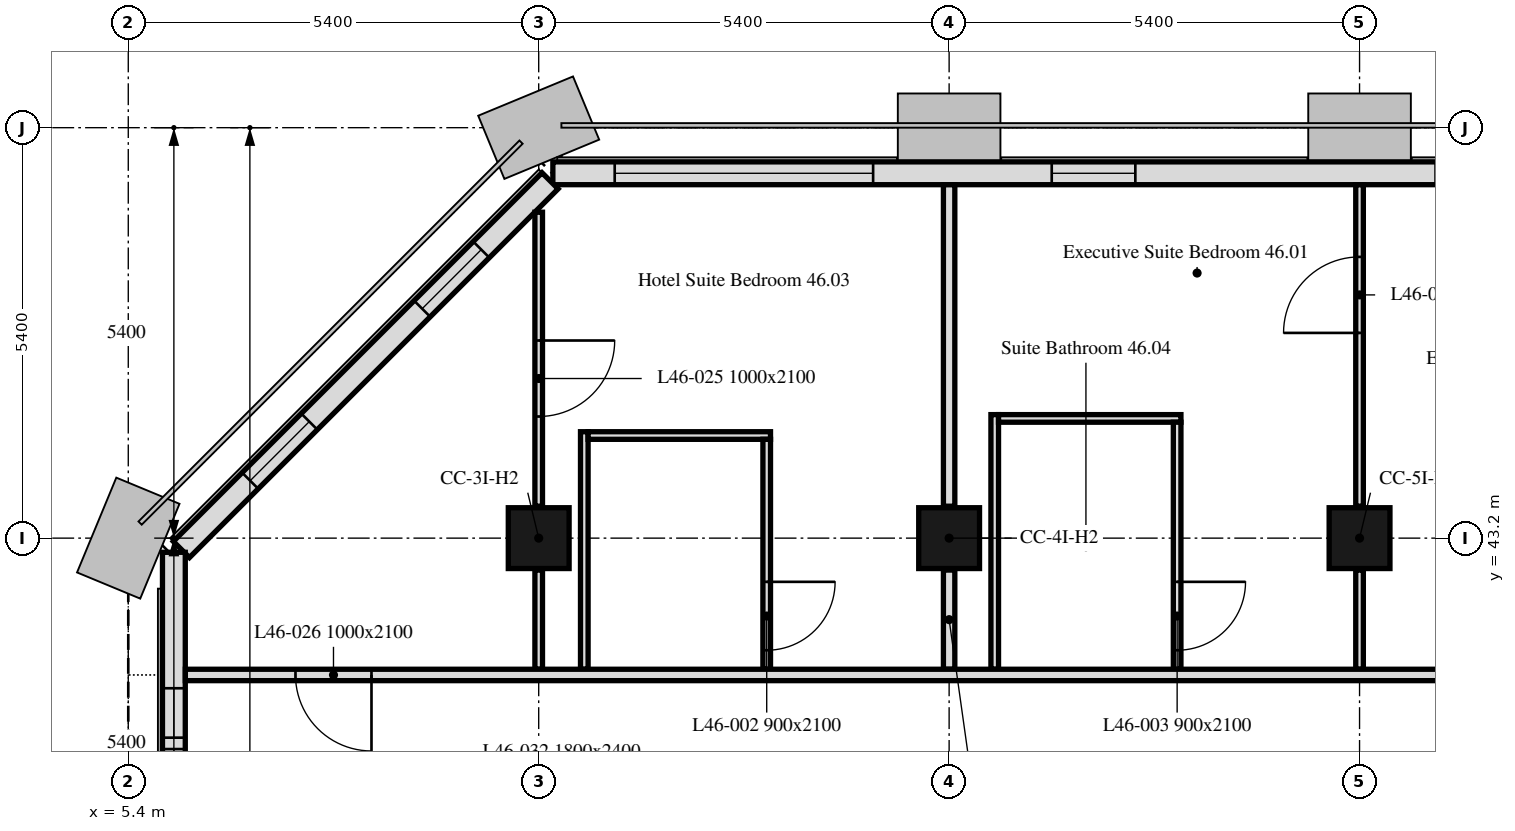
"""IFC4 building model, lengths in metres.
Left out: names, types, materials, properties, quantities, classifications, styles, units other than length and angle.
Written with IfcOpenShell. Run it as: python <this file> out.ifc"""

import sys

from ifc_helpers import new_model, si_unit, direction, frame, frame_2d, origin, origin_2d, place, context, subcontext, project, spatial, rectangle, extrude, element, fill, save


model = new_model("IFC4")
c1 = context("Model", 3, precision=1e-05, world=origin(), true_north=direction((0.0, 1.0)))
c2 = subcontext(c1, "Body", "Model", "MODEL_VIEW")
j1 = project(units=[si_unit("LENGTHUNIT", "METRE"), si_unit("PLANEANGLEUNIT", "RADIAN")], contexts=[c1])
p1 = place(None, origin())
s1 = spatial("IfcSite", under=j1, at=p1, CompositionType="ELEMENT")
p2 = place(p1, origin())
s2 = spatial("IfcBuilding", under=s1, at=p2, CompositionType="ELEMENT")
p3 = place(p2, frame((0.0, 0.0, 190.6)))
s3 = spatial("IfcBuildingStorey", under=s2, at=p3, CompositionType="ELEMENT", Elevation=190.6)
for number, where, z_axis, x_axis in (
    (1, (10.8, 43.2, 0.0), (0.0, 0.0, 1.0), (1.0, 0.0, 0.0)),
    (2, (16.2, 43.2, 0.0), (0.0, 0.0, 1.0), (1.0, 0.0, 0.0)),
    (3, (21.6, 43.2, 0.0), (0.0, 0.0, 1.0), (1.0, 0.0, 0.0)),
):
    element("IfcColumn", number, at=place(p3, frame(where, z_axis=z_axis, x_axis=x_axis)), inside=s3, PredefinedType="COLUMN", context=c2, shape_type="SweptSolid", body=[
        extrude(rectangle(XDim=0.8, YDim=0.8, at=origin_2d()), origin(), (0.0, 0.0, 1.0), 3.0),
    ])
p4 = place(p3, frame((43.014, 48.0, 0.0), z_axis=(0.0, 0.0, 1.0), x_axis=(-1.0, 0.0, 0.0)))
e4 = element("IfcWall", 4, at=p4, inside=s3, PredefinedType="SOLIDWALL", context=c2, shape_type="SweptSolid", body=[
    extrude(rectangle(XDim=32.027, YDim=0.3, at=frame_2d((16.014, 0.0))), origin(), (0.0, 0.0, 1.0), 3.0),
])
p5 = place(p4, frame((2.764, 0.0, 0.9)))
e5 = element("IfcOpeningElement", 5, at=p5, cuts=e4, PredefinedType="OPENING", context=c2, shape_type="SweptSolid", body=[
    extrude(rectangle(XDim=1.1, YDim=1.7, at=frame_2d((0.55, 0.85))), frame((0.0, 0.16, 0.0), z_axis=(0.0, -1.0, 0.0), x_axis=(1.0, 0.0, 0.0)), (0.0, 0.0, 1.0), 0.32),
])
p6 = place(p4, frame((6.214, 0.0, 0.9)))
e6 = element("IfcOpeningElement", 6, at=p6, cuts=e4, PredefinedType="OPENING", context=c2, shape_type="SweptSolid", body=[
    extrude(rectangle(XDim=3.4, YDim=1.7, at=frame_2d((1.7, 0.85))), frame((0.0, 0.16, 0.0), z_axis=(0.0, -1.0, 0.0), x_axis=(1.0, 0.0, 0.0)), (0.0, 0.0, 1.0), 0.32),
])
p7 = place(p4, frame((13.564, 0.0, 0.9)))
e7 = element("IfcOpeningElement", 7, at=p7, cuts=e4, PredefinedType="OPENING", context=c2, shape_type="SweptSolid", body=[
    extrude(rectangle(XDim=1.1, YDim=1.7, at=frame_2d((0.55, 0.85))), frame((0.0, 0.16, 0.0), z_axis=(0.0, -1.0, 0.0), x_axis=(1.0, 0.0, 0.0)), (0.0, 0.0, 1.0), 0.32),
])
p8 = place(p4, frame((17.014, 0.0, 0.9)))
e8 = element("IfcOpeningElement", 8, at=p8, cuts=e4, PredefinedType="OPENING", context=c2, shape_type="SweptSolid", body=[
    extrude(rectangle(XDim=3.4, YDim=1.7, at=frame_2d((1.7, 0.85))), frame((0.0, 0.16, 0.0), z_axis=(0.0, -1.0, 0.0), x_axis=(1.0, 0.0, 0.0)), (0.0, 0.0, 1.0), 0.32),
])
p9 = place(p4, frame((24.364, 0.0, 0.9)))
e9 = element("IfcOpeningElement", 9, at=p9, cuts=e4, PredefinedType="OPENING", context=c2, shape_type="SweptSolid", body=[
    extrude(rectangle(XDim=1.1, YDim=1.7, at=frame_2d((0.55, 0.85))), frame((0.0, 0.16, 0.0), z_axis=(0.0, -1.0, 0.0), x_axis=(1.0, 0.0, 0.0)), (0.0, 0.0, 1.0), 0.32),
])
p10 = place(p4, frame((27.814, 0.0, 0.9)))
e10 = element("IfcOpeningElement", 10, at=p10, cuts=e4, PredefinedType="OPENING", context=c2, shape_type="SweptSolid", body=[
    extrude(rectangle(XDim=3.4, YDim=1.7, at=frame_2d((1.7, 0.85))), frame((0.0, 0.16, 0.0), z_axis=(0.0, -1.0, 0.0), x_axis=(1.0, 0.0, 0.0)), (0.0, 0.0, 1.0), 0.32),
])
p11 = place(p3, frame((10.949, 47.901, 0.0), z_axis=(0.0, 0.0, 1.0), x_axis=(-0.707106781187, -0.707106781187, 0.0)))
e11 = element("IfcWall", 11, at=p11, inside=s3, PredefinedType="SOLIDWALL", context=c2, shape_type="SweptSolid", body=[
    extrude(rectangle(XDim=6.86, YDim=0.3, at=frame_2d((3.43, 0.0))), origin(), (0.0, 0.0, 1.0), 3.0),
])
p12 = place(p11, frame((1.28, 0.0, 0.9)))
e12 = element("IfcOpeningElement", 12, at=p12, cuts=e11, PredefinedType="OPENING", context=c2, shape_type="SweptSolid", body=[
    extrude(rectangle(XDim=1.1, YDim=1.7, at=frame_2d((0.55, 0.85))), frame((0.0, 0.16, 0.0), z_axis=(0.0, -1.0, 0.0), x_axis=(1.0, 0.0, 0.0)), (0.0, 0.0, 1.0), 0.32),
])
p13 = place(p11, frame((4.48, 0.0, 0.9)))
e13 = element("IfcOpeningElement", 13, at=p13, cuts=e11, PredefinedType="OPENING", context=c2, shape_type="SweptSolid", body=[
    extrude(rectangle(XDim=1.1, YDim=1.7, at=frame_2d((0.55, 0.85))), frame((0.0, 0.16, 0.0), z_axis=(0.0, -1.0, 0.0), x_axis=(1.0, 0.0, 0.0)), (0.0, 0.0, 1.0), 0.32),
])
p14 = place(p3, frame((6.0, 43.014, 0.0), z_axis=(0.0, 0.0, 1.0), x_axis=(0.0, -1.0, 0.0)))
e14 = element("IfcWall", 14, at=p14, inside=s3, PredefinedType="SOLIDWALL", context=c2, shape_type="SweptSolid", body=[
    extrude(rectangle(XDim=10.614, YDim=0.3, at=frame_2d((5.307, 0.0))), origin(), (0.0, 0.0, 1.0), 3.0),
])
p15 = place(p14, frame((1.789, 0.0, 0.9)))
e15 = element("IfcOpeningElement", 15, at=p15, cuts=e14, PredefinedType="OPENING", context=c2, shape_type="SweptSolid", body=[
    extrude(rectangle(XDim=0.65, YDim=1.7, at=frame_2d((0.325, 0.85))), frame((0.0, 0.16, 0.0), z_axis=(0.0, -1.0, 0.0), x_axis=(1.0, 0.0, 0.0)), (0.0, 0.0, 1.0), 0.32),
])
p16 = place(p14, frame((2.589, 0.0, 0.9)))
e16 = element("IfcOpeningElement", 16, at=p16, cuts=e14, PredefinedType="OPENING", context=c2, shape_type="SweptSolid", body=[
    extrude(rectangle(XDim=0.65, YDim=1.7, at=frame_2d((0.325, 0.85))), frame((0.0, 0.16, 0.0), z_axis=(0.0, -1.0, 0.0), x_axis=(1.0, 0.0, 0.0)), (0.0, 0.0, 1.0), 0.32),
])
p17 = place(p14, frame((6.214, 0.0, 0.9)))
e17 = element("IfcOpeningElement", 17, at=p17, cuts=e14, PredefinedType="OPENING", context=c2, shape_type="SweptSolid", body=[
    extrude(rectangle(XDim=3.4, YDim=1.7, at=frame_2d((1.7, 0.85))), frame((0.0, 0.16, 0.0), z_axis=(0.0, -1.0, 0.0), x_axis=(1.0, 0.0, 0.0)), (0.0, 0.0, 1.0), 0.32),
])
p18 = place(p3, frame((10.8, 47.488, 0.0), z_axis=(0.0, 0.0, 1.0), x_axis=(0.0, -1.0, 0.0)))
e18 = element("IfcWall", 18, at=p18, inside=s3, PredefinedType="PARTITIONING", context=c2, shape_type="SweptSolid", body=[
    extrude(rectangle(XDim=3.868, YDim=0.1, at=frame_2d((1.934, 0.0))), origin(), (0.0, 0.0, 1.0), 3.0),
])
p19 = place(p18, frame((1.688, 0.0, 0.0)))
e19 = element("IfcOpeningElement", 19, at=p19, cuts=e18, PredefinedType="OPENING", context=c2, shape_type="SweptSolid", body=[
    extrude(rectangle(XDim=1.0, YDim=2.1, at=frame_2d((0.5, 1.05))), frame((0.0, 0.05, 0.0), z_axis=(0.0, -1.0, 0.0), x_axis=(1.0, 0.0, 0.0)), (0.0, 0.0, 1.0), 0.1),
])
p20 = place(p3, frame((10.8, 42.78, 0.0), z_axis=(0.0, 0.0, 1.0), x_axis=(0.0, -1.0, 0.0)))
e20 = element("IfcWall", 20, at=p20, inside=s3, PredefinedType="PARTITIONING", context=c2, shape_type="SweptSolid", body=[
    extrude(rectangle(XDim=1.305, YDim=0.1, at=frame_2d((0.652, 0.0))), origin(), (0.0, 0.0, 1.0), 3.0),
])
p21 = place(p3, frame((11.4, 41.475, 0.0), z_axis=(0.0, 0.0, 1.0), x_axis=(0.0, 1.0, 0.0)))
e21 = element("IfcWall", 21, at=p21, inside=s3, PredefinedType="PARTITIONING", context=c2, shape_type="SweptSolid", body=[
    extrude(rectangle(XDim=3.125, YDim=0.1, at=frame_2d((1.562, 0.0))), origin(), (0.0, 0.0, 1.0), 3.0),
])
p22 = place(p3, frame((11.45, 44.55, 0.0), z_axis=(0.0, 0.0, 1.0), x_axis=(1.0, 0.0, 0.0)))
e22 = element("IfcWall", 22, at=p22, inside=s3, PredefinedType="PARTITIONING", context=c2, shape_type="SweptSolid", body=[
    extrude(rectangle(XDim=2.4, YDim=0.1, at=frame_2d((1.2, 0.0))), origin(), (0.0, 0.0, 1.0), 3.0),
])
p23 = place(p3, frame((13.8, 44.5, 0.0), z_axis=(0.0, 0.0, 1.0), x_axis=(0.0, -1.0, 0.0)))
e23 = element("IfcWall", 23, at=p23, inside=s3, PredefinedType="PARTITIONING", context=c2, shape_type="SweptSolid", body=[
    extrude(rectangle(XDim=3.025, YDim=0.1, at=frame_2d((1.512, 0.0))), origin(), (0.0, 0.0, 1.0), 3.0),
])
p24 = place(p23, frame((1.875, 0.0, 0.0)))
e24 = element("IfcOpeningElement", 24, at=p24, cuts=e23, PredefinedType="OPENING", context=c2, shape_type="SweptSolid", body=[
    extrude(rectangle(XDim=0.9, YDim=2.1, at=frame_2d((0.45, 1.05))), frame((0.0, 0.05, 0.0), z_axis=(0.0, -1.0, 0.0), x_axis=(1.0, 0.0, 0.0)), (0.0, 0.0, 1.0), 0.1),
])
p25 = place(p3, frame((16.2, 41.475, 0.0), z_axis=(0.0, 0.0, 1.0), x_axis=(0.0, 1.0, 0.0)))
e25 = element("IfcWall", 25, at=p25, inside=s3, PredefinedType="PARTITIONING", context=c2, shape_type="SweptSolid", body=[
    extrude(rectangle(XDim=1.305, YDim=0.15, at=frame_2d((0.652, 0.0))), origin(), (0.0, 0.0, 1.0), 2.4),
])
p26 = place(p3, frame((16.2, 43.62, 0.0), z_axis=(0.0, 0.0, 1.0), x_axis=(0.0, 1.0, 0.0)))
e26 = element("IfcWall", 26, at=p26, inside=s3, PredefinedType="PARTITIONING", context=c2, shape_type="SweptSolid", body=[
    extrude(rectangle(XDim=4.229, YDim=0.15, at=frame_2d((2.115, 0.0))), origin(), (0.0, 0.0, 1.0), 2.4),
])
p27 = place(p3, frame((16.8, 41.475, 0.0), z_axis=(0.0, 0.0, 1.0), x_axis=(0.0, 1.0, 0.0)))
e27 = element("IfcWall", 27, at=p27, inside=s3, PredefinedType="PARTITIONING", context=c2, shape_type="SweptSolid", body=[
    extrude(rectangle(XDim=3.35, YDim=0.1, at=frame_2d((1.675, 0.0))), origin(), (0.0, 0.0, 1.0), 3.0),
])
p28 = place(p3, frame((16.85, 44.775, 0.0), z_axis=(0.0, 0.0, 1.0), x_axis=(1.0, 0.0, 0.0)))
e28 = element("IfcWall", 28, at=p28, inside=s3, PredefinedType="PARTITIONING", context=c2, shape_type="SweptSolid", body=[
    extrude(rectangle(XDim=2.4, YDim=0.1, at=frame_2d((1.2, 0.0))), origin(), (0.0, 0.0, 1.0), 3.0),
])
p29 = place(p3, frame((19.2, 44.725, 0.0), z_axis=(0.0, 0.0, 1.0), x_axis=(0.0, -1.0, 0.0)))
e29 = element("IfcWall", 29, at=p29, inside=s3, PredefinedType="PARTITIONING", context=c2, shape_type="SweptSolid", body=[
    extrude(rectangle(XDim=3.25, YDim=0.1, at=frame_2d((1.625, 0.0))), origin(), (0.0, 0.0, 1.0), 3.0),
])
p30 = place(p29, frame((2.1, 0.0, 0.0)))
e30 = element("IfcOpeningElement", 30, at=p30, cuts=e29, PredefinedType="OPENING", context=c2, shape_type="SweptSolid", body=[
    extrude(rectangle(XDim=0.9, YDim=2.1, at=frame_2d((0.45, 1.05))), frame((0.0, 0.05, 0.0), z_axis=(0.0, -1.0, 0.0), x_axis=(1.0, 0.0, 0.0)), (0.0, 0.0, 1.0), 0.1),
])
p31 = place(p3, frame((21.6, 41.475, 0.0), z_axis=(0.0, 0.0, 1.0), x_axis=(0.0, 1.0, 0.0)))
e31 = element("IfcWall", 31, at=p31, inside=s3, PredefinedType="PARTITIONING", context=c2, shape_type="SweptSolid", body=[
    extrude(rectangle(XDim=1.305, YDim=0.1, at=frame_2d((0.652, 0.0))), origin(), (0.0, 0.0, 1.0), 2.4),
])
p32 = place(p3, frame((21.6, 43.62, 0.0), z_axis=(0.0, 0.0, 1.0), x_axis=(0.0, 1.0, 0.0)))
e32 = element("IfcWall", 32, at=p32, inside=s3, PredefinedType="PARTITIONING", context=c2, shape_type="SweptSolid", body=[
    extrude(rectangle(XDim=4.229, YDim=0.1, at=frame_2d((2.115, 0.0))), origin(), (0.0, 0.0, 1.0), 2.4),
])
p33 = place(p32, frame((2.28, 0.0, 0.0)))
e33 = element("IfcOpeningElement", 33, at=p33, cuts=e32, PredefinedType="OPENING", context=c2, shape_type="SweptSolid", body=[
    extrude(rectangle(XDim=1.0, YDim=2.1, at=frame_2d((0.5, 1.05))), frame((0.0, 0.05, 0.0), z_axis=(0.0, -1.0, 0.0), x_axis=(1.0, 0.0, 0.0)), (0.0, 0.0, 1.0), 0.1),
])
p34 = place(p3, frame((47.849, 41.4, 0.0), z_axis=(0.0, 0.0, 1.0), x_axis=(-1.0, 0.0, 0.0)))
e34 = element("IfcWall", 34, at=p34, inside=s3, PredefinedType="PARTITIONING", context=c2, shape_type="SweptSolid", body=[
    extrude(rectangle(XDim=41.698, YDim=0.15, at=frame_2d((20.849, 0.0))), origin(), (0.0, 0.0, 1.0), 2.4),
])
p35 = place(p34, frame((39.249, 0.0, 0.0)))
e35 = element("IfcOpeningElement", 35, at=p35, cuts=e34, PredefinedType="OPENING", context=c2, shape_type="SweptSolid", body=[
    extrude(rectangle(XDim=1.0, YDim=2.1, at=frame_2d((0.5, 1.05))), frame((0.0, 0.075, 0.0), z_axis=(0.0, -1.0, 0.0), x_axis=(1.0, 0.0, 0.0)), (0.0, 0.0, 1.0), 0.15),
])
p36 = place(p34, frame((11.449, 0.0, 0.0)))
e36 = element("IfcOpeningElement", 36, at=p36, cuts=e34, PredefinedType="OPENING", context=c2, shape_type="SweptSolid", body=[
    extrude(rectangle(XDim=1.0, YDim=2.1, at=frame_2d((0.5, 1.05))), frame((0.0, 0.075, 0.0), z_axis=(0.0, -1.0, 0.0), x_axis=(1.0, 0.0, 0.0)), (0.0, 0.0, 1.0), 0.15),
])
p37 = place(p34, frame((3.099, 0.0, 0.0)))
e37 = element("IfcOpeningElement", 37, at=p37, cuts=e34, PredefinedType="OPENING", context=c2, shape_type="SweptSolid", body=[
    extrude(rectangle(XDim=1.0, YDim=2.1, at=frame_2d((0.5, 1.05))), frame((0.0, 0.075, 0.0), z_axis=(0.0, -1.0, 0.0), x_axis=(1.0, 0.0, 0.0)), (0.0, 0.0, 1.0), 0.15),
])
p38 = place(p34, frame((23.049, 0.0, 0.0)))
e38 = element("IfcOpeningElement", 38, at=p38, cuts=e34, PredefinedType="OPENING", context=c2, shape_type="SweptSolid", body=[
    extrude(rectangle(XDim=1.0, YDim=2.1, at=frame_2d((0.5, 1.05))), frame((0.0, 0.075, 0.0), z_axis=(0.0, -1.0, 0.0), x_axis=(1.0, 0.0, 0.0)), (0.0, 0.0, 1.0), 0.15),
])
p39 = place(p9, origin())
e39 = element("IfcWindow", 39, at=p39, inside=s3, PartitioningType="SINGLE_PANEL", PredefinedType="WINDOW", context=c2, shape_type="SweptSolid", body=[
    extrude(rectangle(XDim=1.1, YDim=1.7, at=frame_2d((0.55, 0.85))), frame((0.0, 0.03, 0.0), z_axis=(0.0, -1.0, 0.0), x_axis=(1.0, 0.0, 0.0)), (0.0, 0.0, 1.0), 0.06),
])
fill(e9, e39)
p40 = place(p10, origin())
e40 = element("IfcWindow", 40, at=p40, inside=s3, PartitioningType="SINGLE_PANEL", PredefinedType="WINDOW", context=c2, shape_type="SweptSolid", body=[
    extrude(rectangle(XDim=3.4, YDim=1.7, at=frame_2d((1.7, 0.85))), frame((0.0, 0.03, 0.0), z_axis=(0.0, -1.0, 0.0), x_axis=(1.0, 0.0, 0.0)), (0.0, 0.0, 1.0), 0.06),
])
fill(e10, e40)
p41 = place(p12, origin())
e41 = element("IfcWindow", 41, at=p41, inside=s3, PartitioningType="SINGLE_PANEL", PredefinedType="WINDOW", context=c2, shape_type="SweptSolid", body=[
    extrude(rectangle(XDim=1.1, YDim=1.7, at=frame_2d((0.55, 0.85))), frame((0.0, 0.03, 0.0), z_axis=(0.0, -1.0, 0.0), x_axis=(1.0, 0.0, 0.0)), (0.0, 0.0, 1.0), 0.06),
])
fill(e12, e41)
p42 = place(p13, origin())
e42 = element("IfcWindow", 42, at=p42, inside=s3, PartitioningType="SINGLE_PANEL", PredefinedType="WINDOW", context=c2, shape_type="SweptSolid", body=[
    extrude(rectangle(XDim=1.1, YDim=1.7, at=frame_2d((0.55, 0.85))), frame((0.0, 0.03, 0.0), z_axis=(0.0, -1.0, 0.0), x_axis=(1.0, 0.0, 0.0)), (0.0, 0.0, 1.0), 0.06),
])
fill(e13, e42)
p43 = place(p15, origin())
e43 = element("IfcWindow", 43, at=p43, inside=s3, PartitioningType="SINGLE_PANEL", PredefinedType="WINDOW", context=c2, shape_type="SweptSolid", body=[
    extrude(rectangle(XDim=0.65, YDim=1.7, at=frame_2d((0.325, 0.85))), frame((0.0, 0.03, 0.0), z_axis=(0.0, -1.0, 0.0), x_axis=(1.0, 0.0, 0.0)), (0.0, 0.0, 1.0), 0.06),
])
fill(e15, e43)
p44 = place(p16, origin())
e44 = element("IfcWindow", 44, at=p44, inside=s3, PartitioningType="SINGLE_PANEL", PredefinedType="WINDOW", context=c2, shape_type="SweptSolid", body=[
    extrude(rectangle(XDim=0.65, YDim=1.7, at=frame_2d((0.325, 0.85))), frame((0.0, 0.03, 0.0), z_axis=(0.0, -1.0, 0.0), x_axis=(1.0, 0.0, 0.0)), (0.0, 0.0, 1.0), 0.06),
])
fill(e16, e44)
p45 = place(p24, origin())
e45 = element("IfcDoor", 45, at=p45, inside=s3, OperationType="SINGLE_SWING_LEFT", PredefinedType="DOOR", context=c2, shape_type="SweptSolid", body=[
    extrude(rectangle(XDim=0.9, YDim=2.1, at=frame_2d((0.45, 1.05))), frame((0.0, 0.025, 0.0), z_axis=(0.0, -1.0, 0.0), x_axis=(1.0, 0.0, 0.0)), (0.0, 0.0, 1.0), 0.05),
])
fill(e24, e45)
p46 = place(p30, origin())
e46 = element("IfcDoor", 46, at=p46, inside=s3, OperationType="SINGLE_SWING_LEFT", PredefinedType="DOOR", context=c2, shape_type="SweptSolid", body=[
    extrude(rectangle(XDim=0.9, YDim=2.1, at=frame_2d((0.45, 1.05))), frame((0.0, 0.025, 0.0), z_axis=(0.0, -1.0, 0.0), x_axis=(1.0, 0.0, 0.0)), (0.0, 0.0, 1.0), 0.05),
])
fill(e30, e46)
p47 = place(p19, origin())
e47 = element("IfcDoor", 47, at=p47, inside=s3, OperationType="SINGLE_SWING_LEFT", PredefinedType="DOOR", context=c2, shape_type="SweptSolid", body=[
    extrude(rectangle(XDim=1.0, YDim=2.1, at=frame_2d((0.5, 1.05))), frame((0.0, 0.025, 0.0), z_axis=(0.0, -1.0, 0.0), x_axis=(1.0, 0.0, 0.0)), (0.0, 0.0, 1.0), 0.05),
])
fill(e19, e47)
p48 = place(p35, origin())
e48 = element("IfcDoor", 48, at=p48, inside=s3, OperationType="SINGLE_SWING_RIGHT", PredefinedType="DOOR", context=c2, shape_type="SweptSolid", body=[
    extrude(rectangle(XDim=1.0, YDim=2.1, at=frame_2d((0.5, 1.05))), frame((0.0, 0.025, 0.0), z_axis=(0.0, -1.0, 0.0), x_axis=(1.0, 0.0, 0.0)), (0.0, 0.0, 1.0), 0.05),
])
fill(e35, e48)
p49 = place(p33, origin())
e49 = element("IfcDoor", 49, at=p49, inside=s3, OperationType="SINGLE_SWING_LEFT", PredefinedType="DOOR", context=c2, shape_type="SweptSolid", body=[
    extrude(rectangle(XDim=1.0, YDim=2.1, at=frame_2d((0.5, 1.05))), frame((0.0, 0.025, 0.0), z_axis=(0.0, -1.0, 0.0), x_axis=(1.0, 0.0, 0.0)), (0.0, 0.0, 1.0), 0.05),
])
fill(e33, e49)
save(model, sys.argv[1])
